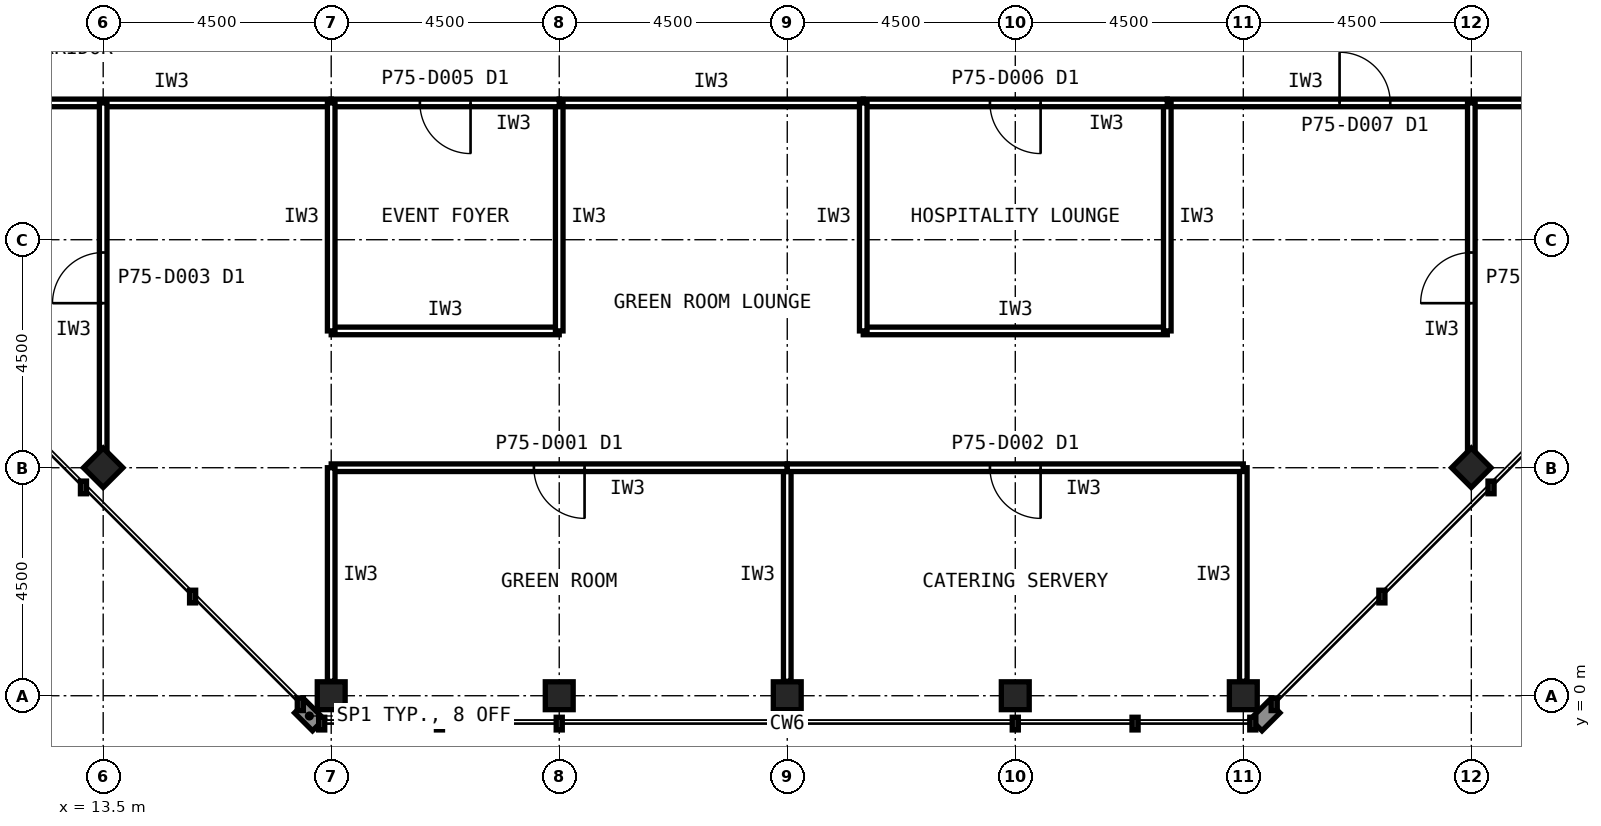
"""IFC4 building model, lengths in metres.
Left out: names, types, materials, properties, quantities, classifications, styles, units other than length and angle.
Written with IfcOpenShell. Run it as: python <this file> out.ifc"""

import sys

from ifc_helpers import new_model, si_unit, direction, frame, frame_2d, origin, origin_2d, place, context, subcontext, project, spatial, rectangle, hollow_rectangle, extrude, element, fill, save


model = new_model("IFC4")
c1 = context("Model", 3, precision=1e-05, world=origin(), true_north=direction((0.0, 1.0)))
c2 = subcontext(c1, "Body", "Model", "MODEL_VIEW")
j1 = project(units=[si_unit("LENGTHUNIT", "METRE"), si_unit("PLANEANGLEUNIT", "RADIAN")], contexts=[c1])
p1 = place(None, origin())
s1 = spatial("IfcSite", under=j1, at=p1, CompositionType="ELEMENT")
p2 = place(p1, origin())
s2 = spatial("IfcBuilding", under=s1, at=p2, CompositionType="ELEMENT")
p3 = place(p2, frame((0.0, 0.0, 315.1)))
s3 = spatial("IfcBuildingStorey", under=s2, at=p3, CompositionType="ELEMENT", Elevation=315.1)
for number, where, z_axis, x_axis in (
    (1, (18.0, 0.0, 0.0), (0.0, 0.0, 1.0), (1.0, 0.0, 0.0)),
    (2, (22.5, 0.0, 0.0), (0.0, 0.0, 1.0), (1.0, 0.0, 0.0)),
    (3, (27.0, 0.0, 0.0), (0.0, 0.0, 1.0), (1.0, 0.0, 0.0)),
    (4, (31.5, 0.0, 0.0), (0.0, 0.0, 1.0), (1.0, 0.0, 0.0)),
    (5, (36.0, 0.0, 0.0), (0.0, 0.0, 1.0), (1.0, 0.0, 0.0)),
    (6, (13.5, 4.5, 0.0), (0.0, 0.0, 1.0), (0.707, 0.707, 0.0)),
    (7, (40.5, 4.5, 0.0), (0.0, 0.0, 1.0), (0.707, 0.707, 0.0)),
):
    element("IfcColumn", number, at=place(p3, frame(where, z_axis=z_axis, x_axis=x_axis)), inside=s3, PredefinedType="COLUMN", context=c2, shape_type="SweptSolid", body=[
        extrude(hollow_rectangle(XDim=0.55, YDim=0.55, WallThickness=0.025, at=origin_2d()), origin(), (0.0, 0.0, 1.0), 5.0),
    ])
p4 = place(p3, frame((34.5, 11.7, 0.0), z_axis=(0.0, 0.0, 1.0), x_axis=(1.0, 0.0, 0.0)))
e8 = element("IfcWall", 8, at=p4, inside=s3, PredefinedType="PARTITIONING", context=c2, shape_type="SweptSolid", body=[
    extrude(rectangle(XDim=7.8, YDim=0.15, at=frame_2d((3.9, 0.0))), origin(), (0.0, 0.0, 1.0), 4.8),
])
p5 = place(p4, frame((3.4, 0.0, 0.0)))
e9 = element("IfcOpeningElement", 9, at=p5, cuts=e8, PredefinedType="OPENING", context=c2, shape_type="SweptSolid", body=[
    extrude(rectangle(XDim=1.0, YDim=2.1, at=frame_2d((0.5, 1.05))), frame((0.0, 0.085, 0.0), z_axis=(0.0, -1.0, 0.0), x_axis=(1.0, 0.0, 0.0)), (0.0, 0.0, 1.0), 0.17),
])
p6 = place(p3, frame((11.7, 11.7, 0.0), z_axis=(0.0, 0.0, 1.0), x_axis=(1.0, 0.0, 0.0)))
e10 = element("IfcWall", 10, at=p6, inside=s3, PredefinedType="PARTITIONING", context=c2, shape_type="SweptSolid", body=[
    extrude(rectangle(XDim=6.3, YDim=0.15, at=frame_2d((3.15, 0.0))), origin(), (0.0, 0.0, 1.0), 4.8),
])
p7 = place(p3, frame((22.5, 11.7, 0.0), z_axis=(0.0, 0.0, 1.0), x_axis=(1.0, 0.0, 0.0)))
e11 = element("IfcWall", 11, at=p7, inside=s3, PredefinedType="PARTITIONING", context=c2, shape_type="SweptSolid", body=[
    extrude(rectangle(XDim=6.0, YDim=0.15, at=frame_2d((3.0, 0.0))), origin(), (0.0, 0.0, 1.0), 4.8),
])
p8 = place(p3, frame((18.0, 7.2, 0.0), z_axis=(0.0, 0.0, 1.0), x_axis=(1.0, 0.0, 0.0)))
e12 = element("IfcWall", 12, at=p8, inside=s3, PredefinedType="PARTITIONING", context=c2, shape_type="SweptSolid", body=[
    extrude(rectangle(XDim=4.5, YDim=0.15, at=frame_2d((2.25, 0.0))), origin(), (0.0, 0.0, 1.0), 4.8),
])
p9 = place(p3, frame((22.5, 7.2, 0.0), z_axis=(0.0, 0.0, 1.0), x_axis=(0.0, 1.0, 0.0)))
e13 = element("IfcWall", 13, at=p9, inside=s3, PredefinedType="PARTITIONING", context=c2, shape_type="SweptSolid", body=[
    extrude(rectangle(XDim=4.5, YDim=0.15, at=frame_2d((2.25, 0.0))), origin(), (0.0, 0.0, 1.0), 3.868),
])
p10 = place(p3, frame((22.5, 11.7, 0.0), z_axis=(0.0, 0.0, 1.0), x_axis=(-1.0, 0.0, 0.0)))
e14 = element("IfcWall", 14, at=p10, inside=s3, PredefinedType="PARTITIONING", context=c2, shape_type="SweptSolid", body=[
    extrude(rectangle(XDim=4.5, YDim=0.15, at=frame_2d((2.25, 0.0))), origin(), (0.0, 0.0, 1.0), 4.8),
])
p11 = place(p10, frame((1.75, 0.0, 0.0)))
e15 = element("IfcOpeningElement", 15, at=p11, cuts=e14, PredefinedType="OPENING", context=c2, shape_type="SweptSolid", body=[
    extrude(rectangle(XDim=1.0, YDim=2.1, at=frame_2d((0.5, 1.05))), frame((0.0, 0.085, 0.0), z_axis=(0.0, -1.0, 0.0), x_axis=(1.0, 0.0, 0.0)), (0.0, 0.0, 1.0), 0.17),
])
p12 = place(p3, frame((18.0, 11.7, 0.0), z_axis=(0.0, 0.0, 1.0), x_axis=(0.0, -1.0, 0.0)))
e16 = element("IfcWall", 16, at=p12, inside=s3, PredefinedType="PARTITIONING", context=c2, shape_type="SweptSolid", body=[
    extrude(rectangle(XDim=4.5, YDim=0.15, at=frame_2d((2.25, 0.0))), origin(), (0.0, 0.0, 1.0), 3.868),
])
p13 = place(p3, frame((28.5, 7.2, 0.0), z_axis=(0.0, 0.0, 1.0), x_axis=(1.0, 0.0, 0.0)))
e17 = element("IfcWall", 17, at=p13, inside=s3, PredefinedType="PARTITIONING", context=c2, shape_type="SweptSolid", body=[
    extrude(rectangle(XDim=6.0, YDim=0.15, at=frame_2d((3.0, 0.0))), origin(), (0.0, 0.0, 1.0), 4.8),
])
p14 = place(p3, frame((34.5, 7.2, 0.0), z_axis=(0.0, 0.0, 1.0), x_axis=(0.0, 1.0, 0.0)))
e18 = element("IfcWall", 18, at=p14, inside=s3, PredefinedType="PARTITIONING", context=c2, shape_type="SweptSolid", body=[
    extrude(rectangle(XDim=4.5, YDim=0.15, at=frame_2d((2.25, 0.0))), origin(), (0.0, 0.0, 1.0), 4.8),
])
p15 = place(p3, frame((34.5, 11.7, 0.0), z_axis=(0.0, 0.0, 1.0), x_axis=(-1.0, 0.0, 0.0)))
e19 = element("IfcWall", 19, at=p15, inside=s3, PredefinedType="PARTITIONING", context=c2, shape_type="SweptSolid", body=[
    extrude(rectangle(XDim=6.0, YDim=0.15, at=frame_2d((3.0, 0.0))), origin(), (0.0, 0.0, 1.0), 4.8),
])
p16 = place(p15, frame((2.5, 0.0, 0.0)))
e20 = element("IfcOpeningElement", 20, at=p16, cuts=e19, PredefinedType="OPENING", context=c2, shape_type="SweptSolid", body=[
    extrude(rectangle(XDim=1.0, YDim=2.1, at=frame_2d((0.5, 1.05))), frame((0.0, 0.085, 0.0), z_axis=(0.0, -1.0, 0.0), x_axis=(1.0, 0.0, 0.0)), (0.0, 0.0, 1.0), 0.17),
])
p17 = place(p3, frame((28.5, 11.7, 0.0), z_axis=(0.0, 0.0, 1.0), x_axis=(0.0, -1.0, 0.0)))
e21 = element("IfcWall", 21, at=p17, inside=s3, PredefinedType="PARTITIONING", context=c2, shape_type="SweptSolid", body=[
    extrude(rectangle(XDim=4.5, YDim=0.15, at=frame_2d((2.25, 0.0))), origin(), (0.0, 0.0, 1.0), 4.8),
])
p18 = place(p3, frame((27.0, 0.285, 0.0), z_axis=(0.0, 0.0, 1.0), x_axis=(0.0, 1.0, 0.0)))
e22 = element("IfcWall", 22, at=p18, inside=s3, PredefinedType="PARTITIONING", context=c2, shape_type="SweptSolid", body=[
    extrude(rectangle(XDim=4.215, YDim=0.15, at=frame_2d((2.107, 0.0))), origin(), (0.0, 0.0, 1.0), 3.868),
])
p19 = place(p3, frame((27.0, 4.5, 0.0), z_axis=(0.0, 0.0, 1.0), x_axis=(-1.0, 0.0, 0.0)))
e23 = element("IfcWall", 23, at=p19, inside=s3, PredefinedType="PARTITIONING", context=c2, shape_type="SweptSolid", body=[
    extrude(rectangle(XDim=9.0, YDim=0.15, at=frame_2d((4.5, 0.0))), origin(), (0.0, 0.0, 1.0), 4.8),
])
p20 = place(p19, frame((4.0, 0.0, 0.0)))
e24 = element("IfcOpeningElement", 24, at=p20, cuts=e23, PredefinedType="OPENING", context=c2, shape_type="SweptSolid", body=[
    extrude(rectangle(XDim=1.0, YDim=2.1, at=frame_2d((0.5, 1.05))), frame((0.0, 0.085, 0.0), z_axis=(0.0, -1.0, 0.0), x_axis=(1.0, 0.0, 0.0)), (0.0, 0.0, 1.0), 0.17),
])
for number, where, z_axis, x_axis in (
    (25, (18.0, 4.5, 0.0), (0.0, 0.0, 1.0), (0.0, -1.0, 0.0)),
    (26, (36.0, 0.285, 0.0), (0.0, 0.0, 1.0), (0.0, 1.0, 0.0)),
):
    element("IfcWall", number, at=place(p3, frame(where, z_axis=z_axis, x_axis=x_axis)), inside=s3, PredefinedType="PARTITIONING", context=c2, shape_type="SweptSolid", body=[
        extrude(rectangle(XDim=4.215, YDim=0.15, at=frame_2d((2.107, 0.0))), origin(), (0.0, 0.0, 1.0), 3.868),
    ])
p21 = place(p3, frame((36.0, 4.5, 0.0), z_axis=(0.0, 0.0, 1.0), x_axis=(-1.0, 0.0, 0.0)))
e27 = element("IfcWall", 27, at=p21, inside=s3, PredefinedType="PARTITIONING", context=c2, shape_type="SweptSolid", body=[
    extrude(rectangle(XDim=9.0, YDim=0.15, at=frame_2d((4.5, 0.0))), origin(), (0.0, 0.0, 1.0), 4.8),
])
p22 = place(p21, frame((4.0, 0.0, 0.0)))
e28 = element("IfcOpeningElement", 28, at=p22, cuts=e27, PredefinedType="OPENING", context=c2, shape_type="SweptSolid", body=[
    extrude(rectangle(XDim=1.0, YDim=2.1, at=frame_2d((0.5, 1.05))), frame((0.0, 0.085, 0.0), z_axis=(0.0, -1.0, 0.0), x_axis=(1.0, 0.0, 0.0)), (0.0, 0.0, 1.0), 0.17),
])
p23 = place(p3, frame((40.5, 4.795, 0.0), z_axis=(0.0, 0.0, 1.0), x_axis=(0.0, 1.0, 0.0)))
e29 = element("IfcWall", 29, at=p23, inside=s3, PredefinedType="PARTITIONING", context=c2, shape_type="SweptSolid", body=[
    extrude(rectangle(XDim=6.905, YDim=0.15, at=frame_2d((3.453, 0.0))), origin(), (0.0, 0.0, 1.0), 3.868),
])
p24 = place(p23, frame((2.952, 0.0, 0.0)))
e30 = element("IfcOpeningElement", 30, at=p24, cuts=e29, PredefinedType="OPENING", context=c2, shape_type="SweptSolid", body=[
    extrude(rectangle(XDim=1.0, YDim=2.1, at=frame_2d((0.5, 1.05))), frame((0.0, 0.085, 0.0), z_axis=(0.0, -1.0, 0.0), x_axis=(1.0, 0.0, 0.0)), (0.0, 0.0, 1.0), 0.17),
])
p25 = place(p3, frame((13.5, 4.795, 0.0), z_axis=(0.0, 0.0, 1.0), x_axis=(0.0, 1.0, 0.0)))
e31 = element("IfcWall", 31, at=p25, inside=s3, PredefinedType="PARTITIONING", context=c2, shape_type="SweptSolid", body=[
    extrude(rectangle(XDim=6.905, YDim=0.15, at=frame_2d((3.453, 0.0))), origin(), (0.0, 0.0, 1.0), 3.868),
])
p26 = place(p25, frame((2.952, 0.0, 0.0)))
e32 = element("IfcOpeningElement", 32, at=p26, cuts=e31, PredefinedType="OPENING", context=c2, shape_type="SweptSolid", body=[
    extrude(rectangle(XDim=1.0, YDim=2.1, at=frame_2d((0.5, 1.05))), frame((0.0, 0.085, 0.0), z_axis=(0.0, -1.0, 0.0), x_axis=(1.0, 0.0, 0.0)), (0.0, 0.0, 1.0), 0.17),
])
p27 = place(p5, origin())
e33 = element("IfcDoor", 33, at=p27, inside=s3, OperationType="SINGLE_SWING_LEFT", PredefinedType="DOOR", context=c2, shape_type="SweptSolid", body=[
    extrude(rectangle(XDim=1.0, YDim=2.1, at=frame_2d((0.5, 1.05))), frame((0.0, 0.025, 0.0), z_axis=(0.0, -1.0, 0.0), x_axis=(1.0, 0.0, 0.0)), (0.0, 0.0, 1.0), 0.05),
])
fill(e9, e33)
p28 = place(p11, origin())
e34 = element("IfcDoor", 34, at=p28, inside=s3, OperationType="SINGLE_SWING_LEFT", PredefinedType="DOOR", context=c2, shape_type="SweptSolid", body=[
    extrude(rectangle(XDim=1.0, YDim=2.1, at=frame_2d((0.5, 1.05))), frame((0.0, 0.025, 0.0), z_axis=(0.0, -1.0, 0.0), x_axis=(1.0, 0.0, 0.0)), (0.0, 0.0, 1.0), 0.05),
])
fill(e15, e34)
p29 = place(p16, origin())
e35 = element("IfcDoor", 35, at=p29, inside=s3, OperationType="SINGLE_SWING_LEFT", PredefinedType="DOOR", context=c2, shape_type="SweptSolid", body=[
    extrude(rectangle(XDim=1.0, YDim=2.1, at=frame_2d((0.5, 1.05))), frame((0.0, 0.025, 0.0), z_axis=(0.0, -1.0, 0.0), x_axis=(1.0, 0.0, 0.0)), (0.0, 0.0, 1.0), 0.05),
])
fill(e20, e35)
p30 = place(p20, origin())
e36 = element("IfcDoor", 36, at=p30, inside=s3, OperationType="SINGLE_SWING_LEFT", PredefinedType="DOOR", context=c2, shape_type="SweptSolid", body=[
    extrude(rectangle(XDim=1.0, YDim=2.1, at=frame_2d((0.5, 1.05))), frame((0.0, 0.025, 0.0), z_axis=(0.0, -1.0, 0.0), x_axis=(1.0, 0.0, 0.0)), (0.0, 0.0, 1.0), 0.05),
])
fill(e24, e36)
p31 = place(p22, origin())
e37 = element("IfcDoor", 37, at=p31, inside=s3, OperationType="SINGLE_SWING_LEFT", PredefinedType="DOOR", context=c2, shape_type="SweptSolid", body=[
    extrude(rectangle(XDim=1.0, YDim=2.1, at=frame_2d((0.5, 1.05))), frame((0.0, 0.025, 0.0), z_axis=(0.0, -1.0, 0.0), x_axis=(1.0, 0.0, 0.0)), (0.0, 0.0, 1.0), 0.05),
])
fill(e28, e37)
p32 = place(p24, origin())
e38 = element("IfcDoor", 38, at=p32, inside=s3, OperationType="SINGLE_SWING_LEFT", PredefinedType="DOOR", context=c2, shape_type="SweptSolid", body=[
    extrude(rectangle(XDim=1.0, YDim=2.1, at=frame_2d((0.5, 1.05))), frame((0.0, 0.025, 0.0), z_axis=(0.0, -1.0, 0.0), x_axis=(1.0, 0.0, 0.0)), (0.0, 0.0, 1.0), 0.05),
])
fill(e30, e38)
p33 = place(p26, origin())
e39 = element("IfcDoor", 39, at=p33, inside=s3, OperationType="SINGLE_SWING_LEFT", PredefinedType="DOOR", context=c2, shape_type="SweptSolid", body=[
    extrude(rectangle(XDim=1.0, YDim=2.1, at=frame_2d((0.5, 1.05))), frame((0.0, 0.025, 0.0), z_axis=(0.0, -1.0, 0.0), x_axis=(1.0, 0.0, 0.0)), (0.0, 0.0, 1.0), 0.05),
])
fill(e32, e39)
save(model, sys.argv[1])
